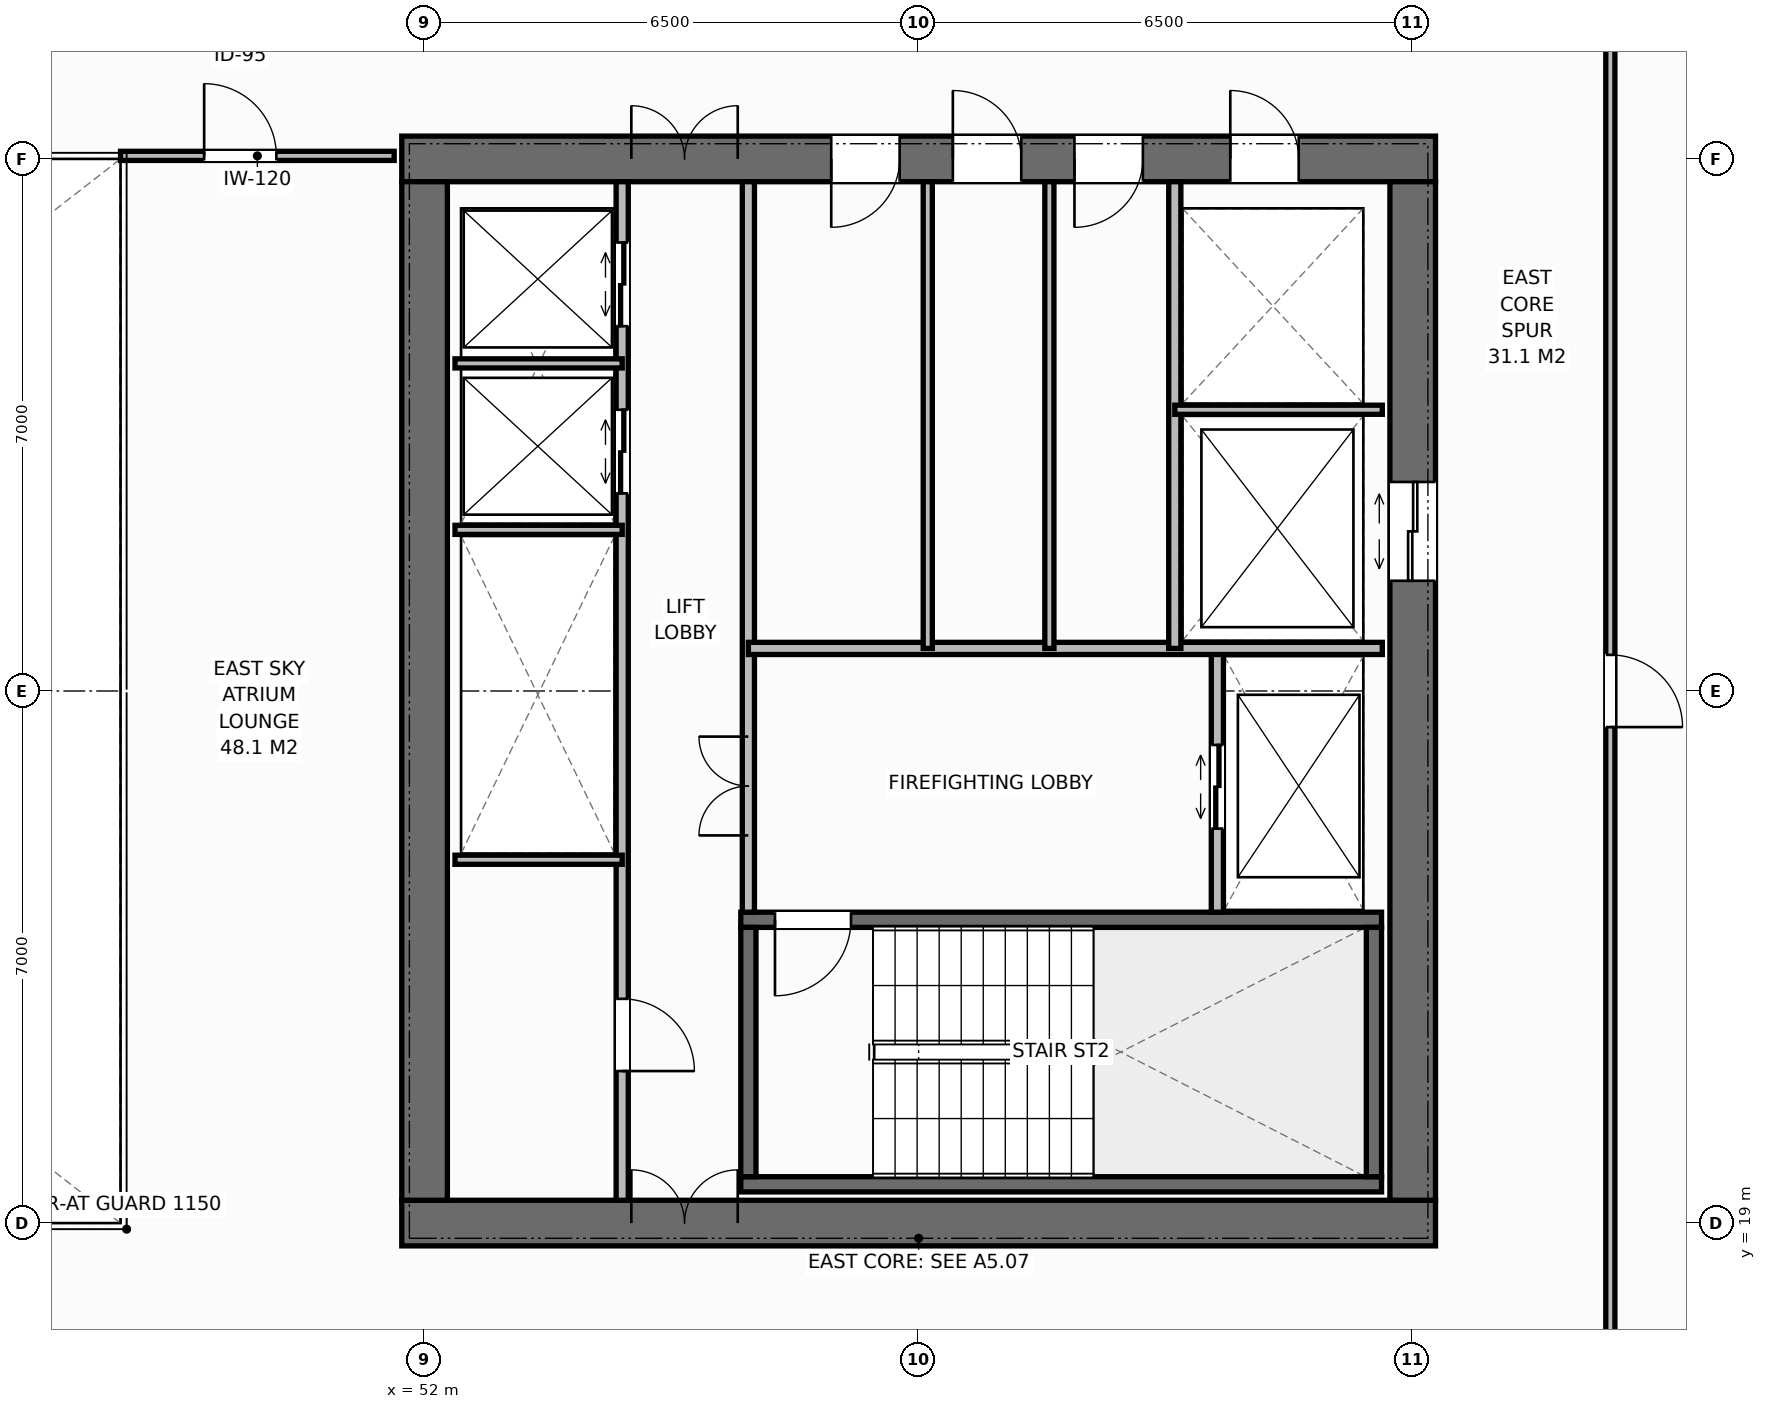
"""IFC4 building model, lengths in metres.
Left out: names, types, materials, properties, quantities, classifications, styles, units other than length and angle.
Written with IfcOpenShell. Run it as: python <this file> out.ifc"""

import sys

from ifc_helpers import new_model, si_unit, direction, frame, frame_2d, origin, place, context, subcontext, project, spatial, rectangle, extrude, element, fill, save


model = new_model("IFC4")
c1 = context("Model", 3, precision=1e-05, world=origin(), true_north=direction((0.0, 1.0)))
c2 = subcontext(c1, "Body", "Model", "MODEL_VIEW")
j1 = project(units=[si_unit("LENGTHUNIT", "METRE"), si_unit("PLANEANGLEUNIT", "RADIAN")], contexts=[c1])
p1 = place(None, origin())
s1 = spatial("IfcSite", under=j1, at=p1, CompositionType="ELEMENT")
p2 = place(p1, origin())
s2 = spatial("IfcBuilding", under=s1, at=p2, CompositionType="ELEMENT")
p3 = place(p2, frame((0.0, 0.0, 148.0)))
s3 = spatial("IfcBuildingStorey", under=s2, at=p3, CompositionType="ELEMENT", Elevation=148.0)
p4 = place(p3, frame((51.7, 19.0, 0.0), z_axis=(0.0, 0.0, 1.0), x_axis=(1.0, 0.0, 0.0)))
e1 = element("IfcWall", 1, at=p4, inside=s3, PredefinedType="SHEAR", context=c2, shape_type="SweptSolid", body=[
    extrude(rectangle(XDim=13.6, YDim=0.6, at=frame_2d((6.8, 0.0))), origin(), (0.0, 0.0, 1.0), 3.8),
])
p5 = place(p4, frame((3.02, 0.0, 0.0)))
e2 = element("IfcOpeningElement", 2, at=p5, cuts=e1, PredefinedType="OPENING", context=c2, shape_type="SweptSolid", body=[
    extrude(rectangle(XDim=1.4, YDim=2.2, at=frame_2d((0.7, 1.1))), frame((0.0, 0.31, 0.0), z_axis=(0.0, -1.0, 0.0), x_axis=(1.0, 0.0, 0.0)), (0.0, 0.0, 1.0), 0.62),
])
p6 = place(p3, frame((51.7, 33.0, 0.0), z_axis=(0.0, 0.0, 1.0), x_axis=(1.0, 0.0, 0.0)))
e3 = element("IfcWall", 3, at=p6, inside=s3, PredefinedType="SHEAR", context=c2, shape_type="SweptSolid", body=[
    extrude(rectangle(XDim=13.6, YDim=0.6, at=frame_2d((6.8, 0.0))), origin(), (0.0, 0.0, 1.0), 3.8),
])
p7 = place(p6, frame((3.02, 0.0, 0.0)))
e4 = element("IfcOpeningElement", 4, at=p7, cuts=e3, PredefinedType="OPENING", context=c2, shape_type="SweptSolid", body=[
    extrude(rectangle(XDim=1.4, YDim=2.2, at=frame_2d((0.7, 1.1))), frame((0.0, 0.31, 0.0), z_axis=(0.0, -1.0, 0.0), x_axis=(1.0, 0.0, 0.0)), (0.0, 0.0, 1.0), 0.62),
])
p8 = place(p6, frame((10.9, 0.0, 0.0)))
e5 = element("IfcOpeningElement", 5, at=p8, cuts=e3, PredefinedType="OPENING", context=c2, shape_type="SweptSolid", body=[
    extrude(rectangle(XDim=0.9, YDim=2.15, at=frame_2d((0.45, 1.075))), frame((0.0, 0.31, 0.0), z_axis=(0.0, -1.0, 0.0), x_axis=(1.0, 0.0, 0.0)), (0.0, 0.0, 1.0), 0.62),
])
p9 = place(p6, frame((5.65, 0.0, 0.0)))
e6 = element("IfcOpeningElement", 6, at=p9, cuts=e3, PredefinedType="OPENING", context=c2, shape_type="SweptSolid", body=[
    extrude(rectangle(XDim=0.9, YDim=2.15, at=frame_2d((0.45, 1.075))), frame((0.0, 0.31, 0.0), z_axis=(0.0, -1.0, 0.0), x_axis=(1.0, 0.0, 0.0)), (0.0, 0.0, 1.0), 0.62),
])
p10 = place(p6, frame((7.25, 0.0, 0.0)))
e7 = element("IfcOpeningElement", 7, at=p10, cuts=e3, PredefinedType="OPENING", context=c2, shape_type="SweptSolid", body=[
    extrude(rectangle(XDim=0.9, YDim=2.15, at=frame_2d((0.45, 1.075))), frame((0.0, 0.31, 0.0), z_axis=(0.0, -1.0, 0.0), x_axis=(1.0, 0.0, 0.0)), (0.0, 0.0, 1.0), 0.62),
])
p11 = place(p6, frame((8.85, 0.0, 0.0)))
e8 = element("IfcOpeningElement", 8, at=p11, cuts=e3, PredefinedType="OPENING", context=c2, shape_type="SweptSolid", body=[
    extrude(rectangle(XDim=0.9, YDim=2.15, at=frame_2d((0.45, 1.075))), frame((0.0, 0.31, 0.0), z_axis=(0.0, -1.0, 0.0), x_axis=(1.0, 0.0, 0.0)), (0.0, 0.0, 1.0), 0.62),
])
p12 = place(p3, frame((52.0, 19.3, 0.0), z_axis=(0.0, 0.0, 1.0), x_axis=(0.0, 1.0, 0.0)))
e9 = element("IfcWall", 9, at=p12, inside=s3, PredefinedType="SHEAR", context=c2, shape_type="SweptSolid", body=[
    extrude(rectangle(XDim=13.4, YDim=0.6, at=frame_2d((6.7, 0.0))), origin(), (0.0, 0.0, 1.0), 3.8),
])
p13 = place(p3, frame((65.0, 19.3, 0.0), z_axis=(0.0, 0.0, 1.0), x_axis=(0.0, 1.0, 0.0)))
e10 = element("IfcWall", 10, at=p13, inside=s3, PredefinedType="SHEAR", context=c2, shape_type="SweptSolid", body=[
    extrude(rectangle(XDim=13.4, YDim=0.6, at=frame_2d((6.7, 0.0))), origin(), (0.0, 0.0, 1.0), 3.8),
])
p14 = place(p13, frame((8.15, 0.0, 0.0)))
e11 = element("IfcOpeningElement", 11, at=p14, cuts=e10, PredefinedType="OPENING", context=c2, shape_type="SweptSolid", body=[
    extrude(rectangle(XDim=1.3, YDim=2.2, at=frame_2d((0.65, 1.1))), frame((0.0, 0.31, 0.0), z_axis=(0.0, -1.0, 0.0), x_axis=(1.0, 0.0, 0.0)), (0.0, 0.0, 1.0), 0.62),
])
p15 = place(p3, frame((56.16, 19.51, 0.0), z_axis=(0.0, 0.0, 1.0), x_axis=(1.0, 0.0, 0.0)))
e12 = element("IfcWall", 12, at=p15, inside=s3, PredefinedType="SHEAR", context=c2, shape_type="SweptSolid", body=[
    extrude(rectangle(XDim=8.43, YDim=0.2, at=frame_2d((4.215, 0.0))), origin(), (0.0, 0.0, 1.0), 3.8),
])
p16 = place(p3, frame((56.16, 22.99, 0.0), z_axis=(0.0, 0.0, 1.0), x_axis=(1.0, 0.0, 0.0)))
e13 = element("IfcWall", 13, at=p16, inside=s3, PredefinedType="SHEAR", context=c2, shape_type="SweptSolid", body=[
    extrude(rectangle(XDim=8.43, YDim=0.2, at=frame_2d((4.215, 0.0))), origin(), (0.0, 0.0, 1.0), 3.8),
])
p17 = place(p16, frame((0.45, 0.0, 0.0)))
e14 = element("IfcOpeningElement", 14, at=p17, cuts=e13, PredefinedType="OPENING", context=c2, shape_type="SweptSolid", body=[
    extrude(rectangle(XDim=1.0, YDim=2.15, at=frame_2d((0.5, 1.075))), frame((0.0, 0.11, 0.0), z_axis=(0.0, -1.0, 0.0), x_axis=(1.0, 0.0, 0.0)), (0.0, 0.0, 1.0), 0.22),
])
for number, where, z_axis, x_axis in (
    (15, (56.26, 19.61, 0.0), (0.0, 0.0, 1.0), (0.0, 1.0, 0.0)),
    (16, (64.49, 19.61, 0.0), (0.0, 0.0, 1.0), (0.0, 1.0, 0.0)),
):
    element("IfcWall", number, at=place(p3, frame(where, z_axis=z_axis, x_axis=x_axis)), inside=s3, PredefinedType="SHEAR", context=c2, shape_type="SweptSolid", body=[
        extrude(rectangle(XDim=3.28, YDim=0.2, at=frame_2d((1.64, 0.0))), origin(), (0.0, 0.0, 1.0), 3.8),
    ])
p18 = place(p3, frame((54.6, 19.3, 0.0), z_axis=(0.0, 0.0, 1.0), x_axis=(0.0, 1.0, 0.0)))
e17 = element("IfcWall", 17, at=p18, inside=s3, PredefinedType="STANDARD", context=c2, shape_type="SweptSolid", body=[
    extrude(rectangle(XDim=13.4, YDim=0.16, at=frame_2d((6.7, 0.0))), origin(), (0.0, 0.0, 1.0), 3.572),
])
p19 = place(p18, frame((1.7, 0.0, 0.0)))
e18 = element("IfcOpeningElement", 18, at=p19, cuts=e17, PredefinedType="OPENING", context=c2, shape_type="SweptSolid", body=[
    extrude(rectangle(XDim=0.95, YDim=2.15, at=frame_2d((0.475, 1.075))), frame((0.0, 0.09, 0.0), z_axis=(0.0, -1.0, 0.0), x_axis=(1.0, 0.0, 0.0)), (0.0, 0.0, 1.0), 0.18),
])
p20 = place(p18, frame((9.3, 0.0, 0.0)))
e19 = element("IfcOpeningElement", 19, at=p20, cuts=e17, PredefinedType="OPENING", context=c2, shape_type="SweptSolid", body=[
    extrude(rectangle(XDim=1.1, YDim=2.2, at=frame_2d((0.55, 1.1))), frame((0.0, 0.09, 0.0), z_axis=(0.0, -1.0, 0.0), x_axis=(1.0, 0.0, 0.0)), (0.0, 0.0, 1.0), 0.18),
])
p21 = place(p18, frame((11.5, 0.0, 0.0)))
e20 = element("IfcOpeningElement", 20, at=p21, cuts=e17, PredefinedType="OPENING", context=c2, shape_type="SweptSolid", body=[
    extrude(rectangle(XDim=1.1, YDim=2.2, at=frame_2d((0.55, 1.1))), frame((0.0, 0.09, 0.0), z_axis=(0.0, -1.0, 0.0), x_axis=(1.0, 0.0, 0.0)), (0.0, 0.0, 1.0), 0.18),
])
p22 = place(p3, frame((56.26, 23.09, 0.0), z_axis=(0.0, 0.0, 1.0), x_axis=(0.0, 1.0, 0.0)))
e21 = element("IfcWall", 21, at=p22, inside=s3, PredefinedType="STANDARD", context=c2, shape_type="SweptSolid", body=[
    extrude(rectangle(XDim=9.61, YDim=0.16, at=frame_2d((4.805, 0.0))), origin(), (0.0, 0.0, 1.0), 3.572),
])
p23 = place(p22, frame((1.01, 0.0, 0.0)))
e22 = element("IfcOpeningElement", 22, at=p23, cuts=e21, PredefinedType="OPENING", context=c2, shape_type="SweptSolid", body=[
    extrude(rectangle(XDim=1.3, YDim=2.2, at=frame_2d((0.65, 1.1))), frame((0.0, 0.09, 0.0), z_axis=(0.0, -1.0, 0.0), x_axis=(1.0, 0.0, 0.0)), (0.0, 0.0, 1.0), 0.18),
])
for number, where, z_axis, x_axis in (
    (23, (52.4, 23.78, 0.0), (0.0, 0.0, 1.0), (1.0, 0.0, 0.0)),
    (24, (52.4, 28.12, 0.0), (0.0, 0.0, 1.0), (1.0, 0.0, 0.0)),
    (25, (52.4, 30.31, 0.0), (0.0, 0.0, 1.0), (1.0, 0.0, 0.0)),
):
    element("IfcWall", number, at=place(p3, frame(where, z_axis=z_axis, x_axis=x_axis)), inside=s3, PredefinedType="PARTITIONING", context=c2, shape_type="SweptSolid", body=[
        extrude(rectangle(XDim=2.2, YDim=0.12, at=frame_2d((1.1, 0.0))), origin(), (0.0, 0.0, 1.0), 3.572),
    ])
p24 = place(p3, frame((62.43, 23.09, 0.0), z_axis=(0.0, 0.0, 1.0), x_axis=(0.0, 1.0, 0.0)))
e26 = element("IfcWall", 26, at=p24, inside=s3, PredefinedType="STANDARD", context=c2, shape_type="SweptSolid", body=[
    extrude(rectangle(XDim=3.47, YDim=0.16, at=frame_2d((1.735, 0.0))), origin(), (0.0, 0.0, 1.0), 3.572),
])
p25 = place(p24, frame((1.1, 0.0, 0.0)))
e27 = element("IfcOpeningElement", 27, at=p25, cuts=e26, PredefinedType="OPENING", context=c2, shape_type="SweptSolid", body=[
    extrude(rectangle(XDim=1.1, YDim=2.2, at=frame_2d((0.55, 1.1))), frame((0.0, 0.09, 0.0), z_axis=(0.0, -1.0, 0.0), x_axis=(1.0, 0.0, 0.0)), (0.0, 0.0, 1.0), 0.18),
])
p26 = place(p3, frame((56.26, 26.56, 0.0), z_axis=(0.0, 0.0, 1.0), x_axis=(1.0, 0.0, 0.0)))
e28 = element("IfcWall", 28, at=p26, inside=s3, PredefinedType="STANDARD", context=c2, shape_type="SweptSolid", body=[
    extrude(rectangle(XDim=8.34, YDim=0.16, at=frame_2d((4.17, 0.0))), origin(), (0.0, 0.0, 1.0), 3.572),
])
p27 = place(p3, frame((61.87, 26.56, 0.0), z_axis=(0.0, 0.0, 1.0), x_axis=(0.0, 1.0, 0.0)))
e29 = element("IfcWall", 29, at=p27, inside=s3, PredefinedType="STANDARD", context=c2, shape_type="SweptSolid", body=[
    extrude(rectangle(XDim=6.14, YDim=0.16, at=frame_2d((3.07, 0.0))), origin(), (0.0, 0.0, 1.0), 3.572),
])
p28 = place(p3, frame((61.87, 29.7, 0.0), z_axis=(0.0, 0.0, 1.0), x_axis=(1.0, 0.0, 0.0)))
e30 = element("IfcWall", 30, at=p28, inside=s3, PredefinedType="PARTITIONING", context=c2, shape_type="SweptSolid", body=[
    extrude(rectangle(XDim=2.73, YDim=0.12, at=frame_2d((1.365, 0.0))), origin(), (0.0, 0.0, 1.0), 3.572),
])
for number, where, z_axis, x_axis in (
    (31, (58.62, 26.56, 0.0), (0.0, 0.0, 1.0), (0.0, 1.0, 0.0)),
    (32, (60.22, 26.56, 0.0), (0.0, 0.0, 1.0), (0.0, 1.0, 0.0)),
):
    element("IfcWall", number, at=place(p3, frame(where, z_axis=z_axis, x_axis=x_axis)), inside=s3, PredefinedType="PARTITIONING", context=c2, shape_type="SweptSolid", body=[
        extrude(rectangle(XDim=6.14, YDim=0.12, at=frame_2d((3.07, 0.0))), origin(), (0.0, 0.0, 1.0), 3.572),
    ])
p29 = place(p3, frame((48.0, 33.04, 0.0), z_axis=(0.0, 0.0, 1.0), x_axis=(1.0, 0.0, 0.0)))
e33 = element("IfcWall", 33, at=p29, inside=s3, PredefinedType="PARTITIONING", context=c2, shape_type="SweptSolid", body=[
    extrude(rectangle(XDim=3.6, YDim=0.12, at=frame_2d((1.8, 0.0))), origin(), (0.0, 0.0, 1.0), 3.312),
])
p30 = place(p29, frame((1.1, 0.0, 0.0)))
e34 = element("IfcOpeningElement", 34, at=p30, cuts=e33, PredefinedType="OPENING", context=c2, shape_type="SweptSolid", body=[
    extrude(rectangle(XDim=0.95, YDim=2.15, at=frame_2d((0.475, 1.075))), frame((0.0, 0.07, 0.0), z_axis=(0.0, -1.0, 0.0), x_axis=(1.0, 0.0, 0.0)), (0.0, 0.0, 1.0), 0.14),
])
p31 = place(p3, frame((67.6, 16.5, 0.0), z_axis=(0.0, 0.0, 1.0), x_axis=(0.0, 1.0, 0.0)))
e35 = element("IfcWall", 35, at=p31, inside=s3, PredefinedType="PARTITIONING", context=c2, shape_type="SweptSolid", body=[
    extrude(rectangle(XDim=19.0, YDim=0.12, at=frame_2d((9.5, 0.0))), origin(), (0.0, 0.0, 1.0), 3.572),
])
p32 = place(p31, frame((9.025, 0.0, 0.0)))
e36 = element("IfcOpeningElement", 36, at=p32, cuts=e35, PredefinedType="OPENING", context=c2, shape_type="SweptSolid", body=[
    extrude(rectangle(XDim=0.95, YDim=2.15, at=frame_2d((0.475, 1.075))), frame((0.0, 0.07, 0.0), z_axis=(0.0, -1.0, 0.0), x_axis=(1.0, 0.0, 0.0)), (0.0, 0.0, 1.0), 0.14),
])
p33 = place(p5, origin())
e37 = element("IfcDoor", 37, at=p33, inside=s3, OperationType="DOUBLE_DOOR_SINGLE_SWING", PredefinedType="DOOR", context=c2, shape_type="SweptSolid", body=[
    extrude(rectangle(XDim=1.4, YDim=2.2, at=frame_2d((0.7, 1.1))), frame((0.0, 0.075, 0.0), z_axis=(0.0, -1.0, 0.0), x_axis=(1.0, 0.0, 0.0)), (0.0, 0.0, 1.0), 0.05),
])
fill(e2, e37)
p34 = place(p7, origin())
e38 = element("IfcDoor", 38, at=p34, inside=s3, OperationType="DOUBLE_DOOR_SINGLE_SWING", PredefinedType="DOOR", context=c2, shape_type="SweptSolid", body=[
    extrude(rectangle(XDim=1.4, YDim=2.2, at=frame_2d((0.7, 1.1))), frame((0.0, -0.025, 0.0), z_axis=(0.0, -1.0, 0.0), x_axis=(1.0, 0.0, 0.0)), (0.0, 0.0, 1.0), 0.05),
])
fill(e4, e38)
p35 = place(p19, origin())
e39 = element("IfcDoor", 39, at=p35, inside=s3, OperationType="SINGLE_SWING_RIGHT", PredefinedType="DOOR", context=c2, shape_type="SweptSolid", body=[
    extrude(rectangle(XDim=0.95, YDim=2.15, at=frame_2d((0.475, 1.075))), frame((0.0, 0.025, 0.0), z_axis=(0.0, -1.0, 0.0), x_axis=(1.0, 0.0, 0.0)), (0.0, 0.0, 1.0), 0.05),
])
fill(e18, e39)
p36 = place(p20, origin())
e40 = element("IfcDoor", 40, at=p36, inside=s3, OperationType="DOUBLE_DOOR_SLIDING", PredefinedType="DOOR", context=c2, shape_type="SweptSolid", body=[
    extrude(rectangle(XDim=1.1, YDim=2.2, at=frame_2d((0.55, 1.1))), frame((0.0, 0.025, 0.0), z_axis=(0.0, -1.0, 0.0), x_axis=(1.0, 0.0, 0.0)), (0.0, 0.0, 1.0), 0.05),
])
fill(e19, e40)
p37 = place(p21, origin())
e41 = element("IfcDoor", 41, at=p37, inside=s3, OperationType="DOUBLE_DOOR_SLIDING", PredefinedType="DOOR", context=c2, shape_type="SweptSolid", body=[
    extrude(rectangle(XDim=1.1, YDim=2.2, at=frame_2d((0.55, 1.1))), frame((0.0, 0.025, 0.0), z_axis=(0.0, -1.0, 0.0), x_axis=(1.0, 0.0, 0.0)), (0.0, 0.0, 1.0), 0.05),
])
fill(e20, e41)
p38 = place(p17, origin())
e42 = element("IfcDoor", 42, at=p38, inside=s3, OperationType="SINGLE_SWING_RIGHT", PredefinedType="DOOR", context=c2, shape_type="SweptSolid", body=[
    extrude(rectangle(XDim=1.0, YDim=2.15, at=frame_2d((0.5, 1.075))), frame((0.0, 0.025, 0.0), z_axis=(0.0, -1.0, 0.0), x_axis=(1.0, 0.0, 0.0)), (0.0, 0.0, 1.0), 0.05),
])
fill(e14, e42)
p39 = place(p25, origin())
e43 = element("IfcDoor", 43, at=p39, inside=s3, OperationType="DOUBLE_DOOR_SLIDING", PredefinedType="DOOR", context=c2, shape_type="SweptSolid", body=[
    extrude(rectangle(XDim=1.1, YDim=2.2, at=frame_2d((0.55, 1.1))), frame((0.0, 0.025, 0.0), z_axis=(0.0, -1.0, 0.0), x_axis=(1.0, 0.0, 0.0)), (0.0, 0.0, 1.0), 0.05),
])
fill(e27, e43)
p40 = place(p23, origin())
e44 = element("IfcDoor", 44, at=p40, inside=s3, OperationType="DOUBLE_DOOR_SINGLE_SWING", PredefinedType="DOOR", context=c2, shape_type="SweptSolid", body=[
    extrude(rectangle(XDim=1.3, YDim=2.2, at=frame_2d((0.65, 1.1))), frame((0.0, 0.025, 0.0), z_axis=(0.0, -1.0, 0.0), x_axis=(1.0, 0.0, 0.0)), (0.0, 0.0, 1.0), 0.05),
])
fill(e22, e44)
p41 = place(p14, origin())
e45 = element("IfcDoor", 45, at=p41, inside=s3, OperationType="DOUBLE_DOOR_SLIDING", PredefinedType="DOOR", context=c2, shape_type="SweptSolid", body=[
    extrude(rectangle(XDim=1.3, YDim=2.2, at=frame_2d((0.65, 1.1))), frame((0.0, 0.025, 0.0), z_axis=(0.0, -1.0, 0.0), x_axis=(1.0, 0.0, 0.0)), (0.0, 0.0, 1.0), 0.05),
])
fill(e11, e45)
p42 = place(p8, origin())
e46 = element("IfcDoor", 46, at=p42, inside=s3, OperationType="SINGLE_SWING_LEFT", PredefinedType="DOOR", context=c2, shape_type="SweptSolid", body=[
    extrude(rectangle(XDim=0.9, YDim=2.15, at=frame_2d((0.45, 1.075))), frame((0.0, -0.025, 0.0), z_axis=(0.0, -1.0, 0.0), x_axis=(1.0, 0.0, 0.0)), (0.0, 0.0, 1.0), 0.05),
])
fill(e5, e46)
p43 = place(p9, origin())
e47 = element("IfcDoor", 47, at=p43, inside=s3, OperationType="SINGLE_SWING_RIGHT", PredefinedType="DOOR", context=c2, shape_type="SweptSolid", body=[
    extrude(rectangle(XDim=0.9, YDim=2.15, at=frame_2d((0.45, 1.075))), frame((0.0, -0.025, 0.0), z_axis=(0.0, -1.0, 0.0), x_axis=(1.0, 0.0, 0.0)), (0.0, 0.0, 1.0), 0.05),
])
fill(e6, e47)
p44 = place(p10, origin())
e48 = element("IfcDoor", 48, at=p44, inside=s3, OperationType="SINGLE_SWING_LEFT", PredefinedType="DOOR", context=c2, shape_type="SweptSolid", body=[
    extrude(rectangle(XDim=0.9, YDim=2.15, at=frame_2d((0.45, 1.075))), frame((0.0, -0.025, 0.0), z_axis=(0.0, -1.0, 0.0), x_axis=(1.0, 0.0, 0.0)), (0.0, 0.0, 1.0), 0.05),
])
fill(e7, e48)
p45 = place(p11, origin())
e49 = element("IfcDoor", 49, at=p45, inside=s3, OperationType="SINGLE_SWING_RIGHT", PredefinedType="DOOR", context=c2, shape_type="SweptSolid", body=[
    extrude(rectangle(XDim=0.9, YDim=2.15, at=frame_2d((0.45, 1.075))), frame((0.0, -0.025, 0.0), z_axis=(0.0, -1.0, 0.0), x_axis=(1.0, 0.0, 0.0)), (0.0, 0.0, 1.0), 0.05),
])
fill(e8, e49)
p46 = place(p30, origin())
e50 = element("IfcDoor", 50, at=p46, inside=s3, OperationType="SINGLE_SWING_LEFT", PredefinedType="DOOR", context=c2, shape_type="SweptSolid", body=[
    extrude(rectangle(XDim=0.95, YDim=2.15, at=frame_2d((0.475, 1.075))), frame((0.0, 0.025, 0.0), z_axis=(0.0, -1.0, 0.0), x_axis=(1.0, 0.0, 0.0)), (0.0, 0.0, 1.0), 0.05),
])
fill(e34, e50)
p47 = place(p32, origin())
e51 = element("IfcDoor", 51, at=p47, inside=s3, OperationType="SINGLE_SWING_RIGHT", PredefinedType="DOOR", context=c2, shape_type="SweptSolid", body=[
    extrude(rectangle(XDim=0.95, YDim=2.15, at=frame_2d((0.475, 1.075))), frame((0.0, 0.025, 0.0), z_axis=(0.0, -1.0, 0.0), x_axis=(1.0, 0.0, 0.0)), (0.0, 0.0, 1.0), 0.05),
])
fill(e36, e51)
save(model, sys.argv[1])
